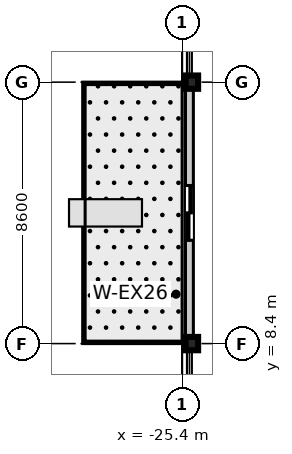
"""IFC4 building model, lengths in metres.
Left out: names, types, materials, properties, quantities, classifications, styles, units other than length and angle.
Written with IfcOpenShell. Run it as: python <this file> out.ifc"""

import sys

from ifc_helpers import new_model, si_unit, direction, frame, frame_2d, origin, origin_2d, place, context, subcontext, project, spatial, rectangle, i_section, extrude, source, transform, mapped, element, fill, save


model = new_model("IFC4")
c1 = context("Model", 3, precision=1e-05, world=origin(), true_north=direction((0.0, 1.0)))
c2 = subcontext(c1, "Body", "Model", "MODEL_VIEW")
j1 = project(units=[si_unit("LENGTHUNIT", "METRE"), si_unit("PLANEANGLEUNIT", "RADIAN")], contexts=[c1])
p1 = place(None, origin())
s1 = spatial("IfcSite", under=j1, at=p1, CompositionType="ELEMENT")
p2 = place(p1, origin())
s2 = spatial("IfcBuilding", under=s1, at=p2, CompositionType="ELEMENT")
p3 = place(p2, frame((0.0, 0.0, 32.4)))
s3 = spatial("IfcBuildingStorey", under=s2, at=p3, CompositionType="ELEMENT", Elevation=32.4)
m1 = source(origin(), c2, "Body", "SweptSolid", [
    extrude(i_section(OverallWidth=0.412, OverallDepth=0.438, WebThickness=0.023, FlangeThickness=0.036, at=origin_2d()), origin(), (0.0, 0.0, 1.0), 3.605),
])
for number, where, z_axis, x_axis in (
    (1, (-25.08, 8.4, 0.0), (0.0, 0.0, 1.0), (1.0, 0.0, 0.0)),
    (2, (-25.08, 17.0, 0.0), (0.0, 0.0, 1.0), (1.0, 0.0, 0.0)),
):
    element("IfcColumn", number, at=place(p3, frame(where, z_axis=z_axis, x_axis=x_axis)), inside=s3, PredefinedType="COLUMN", context=c2, shape_type="MappedRepresentation", body=[
        mapped(m1, transform((0.0, 0.0, 0.0), scale=1.0)),
    ])
m2 = source(origin(), c2, "Body", "SweptSolid", [
    extrude(rectangle(XDim=8.6, YDim=0.26, at=frame_2d((4.3, 0.0))), origin(), (0.0, 0.0, 1.0), 2.85),
])
p4 = place(p3, frame((-25.16, 8.4, 0.0), z_axis=(0.0, 0.0, 1.0), x_axis=(0.0, 1.0, 0.0)))
e3 = element("IfcWall", 3, at=p4, inside=s3, PredefinedType="STANDARD", context=c2, shape_type="MappedRepresentation", body=[
    mapped(m2, transform((0.0, 0.0, 0.0), scale=1.0)),
])
p5 = place(p4, frame((3.4, 0.0, 0.0)))
e4 = element("IfcOpeningElement", 4, at=p5, cuts=e3, PredefinedType="OPENING", context=c2, shape_type="SweptSolid", body=[
    extrude(rectangle(XDim=1.8, YDim=2.25, at=frame_2d((0.9, 1.125))), frame((0.0, 0.14, 0.0), z_axis=(0.0, -1.0, 0.0), x_axis=(1.0, 0.0, 0.0)), (0.0, 0.0, 1.0), 0.28),
])
m3 = source(origin(), c2, "Body", "SweptSolid", [
    extrude(rectangle(XDim=1.8, YDim=2.25, at=frame_2d((0.9, 1.125))), frame((0.0, 0.025, 0.0), z_axis=(0.0, -1.0, 0.0), x_axis=(1.0, 0.0, 0.0)), (0.0, 0.0, 1.0), 0.05),
])
p6 = place(p5, origin())
e5 = element("IfcDoor", 5, at=p6, inside=s3, OperationType="DOUBLE_DOOR_SLIDING", PredefinedType="DOOR", context=c2, shape_type="MappedRepresentation", body=[
    mapped(m3, transform((0.0, 0.0, 0.0), scale=1.0)),
])
fill(e4, e5)
save(model, sys.argv[1])
